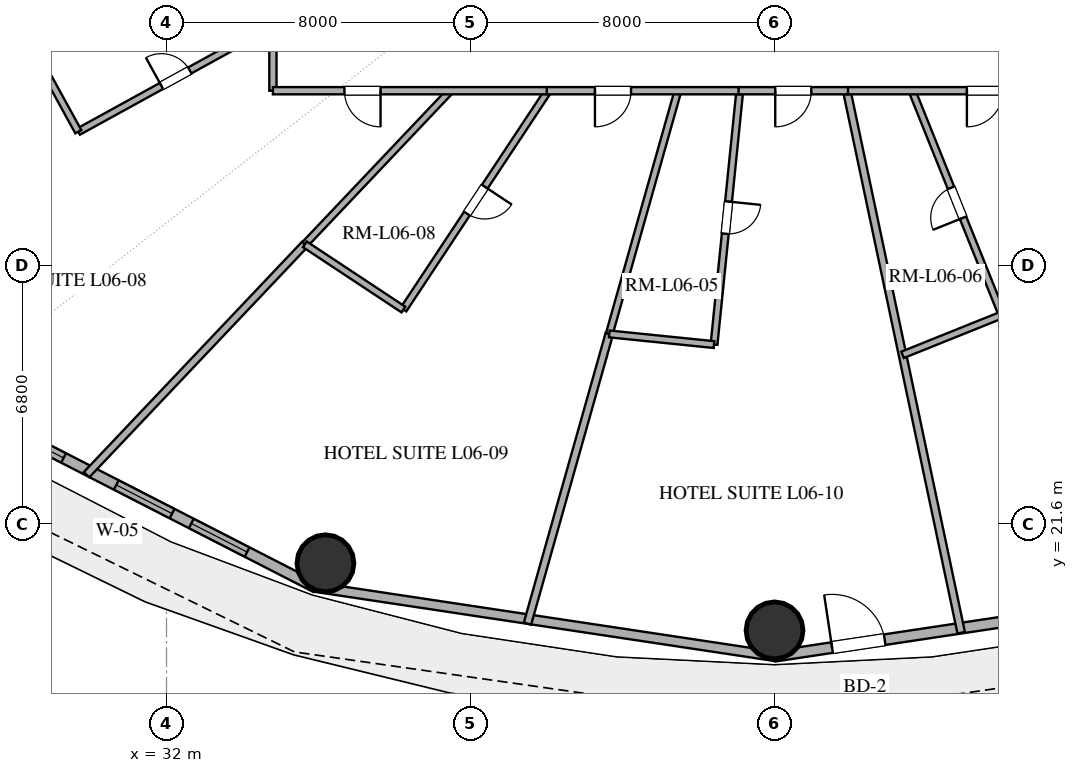
"""IFC4 building model, lengths in metres.
Left out: names, types, materials, properties, quantities, classifications, styles, units other than length and angle.
Written with IfcOpenShell. Run it as: python <this file> out.ifc"""

import sys

from ifc_helpers import new_model, si_unit, direction, frame, frame_2d, origin, origin_2d, place, context, subcontext, project, spatial, rectangle, hollow_circle, extrude, element, fill, save


model = new_model("IFC4")
c1 = context("Model", 3, precision=1e-05, world=origin(), true_north=direction((0.0, 1.0)))
c2 = subcontext(c1, "Body", "Model", "MODEL_VIEW")
j1 = project(units=[si_unit("LENGTHUNIT", "METRE"), si_unit("PLANEANGLEUNIT", "RADIAN")], contexts=[c1])
p1 = place(None, origin())
s1 = spatial("IfcSite", under=j1, at=p1, CompositionType="ELEMENT")
p2 = place(p1, origin())
s2 = spatial("IfcBuilding", under=s1, at=p2, CompositionType="ELEMENT")
p3 = place(p2, frame((0.0, 0.0, 31.8)))
s3 = spatial("IfcBuildingStorey", under=s2, at=p3, CompositionType="ELEMENT", Elevation=31.8)
for number, where, z_axis, x_axis in (
    (1, (36.182, 20.566, 0.0), (0.0, 0.0, 1.0), (1.0, 0.0, 0.0)),
    (2, (48.0, 18.8, 0.0), (0.0, 0.0, 1.0), (1.0, 0.0, 0.0)),
):
    element("IfcColumn", number, at=place(p3, frame(where, z_axis=z_axis, x_axis=x_axis)), inside=s3, PredefinedType="COLUMN", context=c2, shape_type="SweptSolid", body=[
        extrude(hollow_circle(Radius=0.75, WallThickness=0.04, at=origin_2d()), origin(), (0.0, 0.0, 1.0), 3.38),
    ])
p4 = place(p3, frame((25.826, 25.114, 0.0), z_axis=(0.0, 0.0, 1.0), x_axis=(0.889853976658, -0.456245438581, 0.0)))
e3 = element("IfcWall", 3, at=p4, inside=s3, PredefinedType="SOLIDWALL", context=c2, shape_type="SweptSolid", body=[
    extrude(rectangle(XDim=11.346, YDim=0.28, at=frame_2d((5.673, 0.0))), origin(), (0.0, 0.0, 1.0), 3.38),
])
p5 = place(p4, frame((2.095, 0.0, 0.85)))
e4 = element("IfcOpeningElement", 4, at=p5, cuts=e3, PredefinedType="OPENING", context=c2, shape_type="SweptSolid", body=[
    extrude(rectangle(XDim=1.8, YDim=2.2, at=frame_2d((0.9, 1.1))), frame((0.0, 0.15, 0.0), z_axis=(0.0, -1.0, 0.0), x_axis=(1.0, 0.0, 0.0)), (0.0, 0.0, 1.0), 0.3),
])
p6 = place(p4, frame((5.453, 0.0, 0.85)))
e5 = element("IfcOpeningElement", 5, at=p6, cuts=e3, PredefinedType="OPENING", context=c2, shape_type="SweptSolid", body=[
    extrude(rectangle(XDim=1.65, YDim=2.0, at=frame_2d((0.825, 1.0))), frame((0.0, 0.15, 0.0), z_axis=(0.0, -1.0, 0.0), x_axis=(1.0, 0.0, 0.0)), (0.0, 0.0, 1.0), 0.3),
])
p7 = place(p4, frame((7.672, 0.0, 0.85)))
e6 = element("IfcOpeningElement", 6, at=p7, cuts=e3, PredefinedType="OPENING", context=c2, shape_type="SweptSolid", body=[
    extrude(rectangle(XDim=1.65, YDim=2.0, at=frame_2d((0.825, 1.0))), frame((0.0, 0.15, 0.0), z_axis=(0.0, -1.0, 0.0), x_axis=(1.0, 0.0, 0.0)), (0.0, 0.0, 1.0), 0.3),
])
p8 = place(p3, frame((35.922, 19.938, 0.0), z_axis=(0.0, 0.0, 1.0), x_axis=(0.988864835849, -0.148816452121, 0.0)))
e7 = element("IfcWall", 7, at=p8, inside=s3, PredefinedType="SOLIDWALL", context=c2, shape_type="SweptSolid", body=[
    extrude(rectangle(XDim=12.214, YDim=0.25, at=frame_2d((6.107, 0.0))), origin(), (0.0, 0.0, 1.0), 3.38),
])
p9 = place(p3, frame((48.0, 18.12, 0.0), z_axis=(0.0, 0.0, 1.0), x_axis=(0.988864835849, 0.148816452121, 0.0)))
e8 = element("IfcWall", 8, at=p9, inside=s3, PredefinedType="SOLIDWALL", context=c2, shape_type="SweptSolid", body=[
    extrude(rectangle(XDim=12.214, YDim=0.28, at=frame_2d((6.107, 0.0))), origin(), (0.0, 0.0, 1.0), 3.38),
])
p10 = place(p9, frame((1.531, 0.0, 0.0)))
e9 = element("IfcOpeningElement", 9, at=p10, cuts=e8, PredefinedType="OPENING", context=c2, shape_type="SweptSolid", body=[
    extrude(rectangle(XDim=1.4, YDim=2.2, at=frame_2d((0.7, 1.1))), frame((0.0, 0.15, 0.0), z_axis=(0.0, -1.0, 0.0), x_axis=(1.0, 0.0, 0.0)), (0.0, 0.0, 1.0), 0.3),
])
p11 = place(p9, frame((6.016, 0.0, 0.85)))
e10 = element("IfcOpeningElement", 10, at=p11, cuts=e8, PredefinedType="OPENING", context=c2, shape_type="SweptSolid", body=[
    extrude(rectangle(XDim=1.5, YDim=1.8, at=frame_2d((0.75, 0.9))), frame((0.0, 0.15, 0.0), z_axis=(0.0, -1.0, 0.0), x_axis=(1.0, 0.0, 0.0)), (0.0, 0.0, 1.0), 0.3),
])
p12 = place(p9, frame((8.333, 0.0, 0.85)))
e11 = element("IfcOpeningElement", 11, at=p12, cuts=e8, PredefinedType="OPENING", context=c2, shape_type="SweptSolid", body=[
    extrude(rectangle(XDim=1.5, YDim=1.8, at=frame_2d((0.75, 0.9))), frame((0.0, 0.15, 0.0), z_axis=(0.0, -1.0, 0.0), x_axis=(1.0, 0.0, 0.0)), (0.0, 0.0, 1.0), 0.3),
])
p13 = place(p3, frame((34.8, 37.494, 0.0), z_axis=(0.0, 0.0, 1.0), x_axis=(-0.946390715793, -0.32302416792, 0.0)))
e12 = element("IfcWall", 12, at=p13, inside=s3, PredefinedType="PARTITIONING", context=c2, shape_type="SweptSolid", body=[
    extrude(rectangle(XDim=15.952, YDim=0.2, at=frame_2d((7.976, 0.0))), origin(), (0.0, 0.0, 1.0), 2.74),
])
p14 = place(p3, frame((29.897, 22.898, 0.0), z_axis=(0.0, 0.0, 1.0), x_axis=(0.687860615602, 0.725842802198, 0.0)))
e13 = element("IfcWall", 13, at=p14, inside=s3, PredefinedType="PARTITIONING", context=c2, shape_type="SweptSolid", body=[
    extrude(rectangle(XDim=8.35, YDim=0.2, at=frame_2d((4.175, 0.0))), origin(), (0.0, 0.0, 1.0), 2.74),
])
p15 = place(p3, frame((41.499, 18.978, 0.0), z_axis=(0.0, 0.0, 1.0), x_axis=(0.271768364569, 0.962362694632, 0.0)))
e14 = element("IfcWall", 14, at=p15, inside=s3, PredefinedType="PARTITIONING", context=c2, shape_type="SweptSolid", body=[
    extrude(rectangle(XDim=7.921, YDim=0.2, at=frame_2d((3.96, 0.0))), origin(), (0.0, 0.0, 1.0), 2.74),
])
p16 = place(p3, frame((49.9, 33.0, 0.0), z_axis=(0.0, 0.0, 1.0), x_axis=(0.206598790959, -0.97842574556, 0.0)))
e15 = element("IfcWall", 15, at=p16, inside=s3, PredefinedType="PARTITIONING", context=c2, shape_type="SweptSolid", body=[
    extrude(rectangle(XDim=14.576, YDim=0.2, at=frame_2d((7.288, 0.0))), origin(), (0.0, 0.0, 1.0), 2.74),
])
p17 = place(p3, frame((42.045, 33.0, 0.0), z_axis=(0.0, 0.0, 1.0), x_axis=(-0.551832909025, -0.833954699319, 0.0)))
e16 = element("IfcWall", 16, at=p17, inside=s3, PredefinedType="PLUMBINGWALL", context=c2, shape_type="SweptSolid", body=[
    extrude(rectangle(XDim=6.905, YDim=0.18, at=frame_2d((3.452, 0.0))), origin(), (0.0, 0.0, 1.0), 2.74),
])
p18 = place(p17, frame((3.027, 0.0, 0.0)))
e17 = element("IfcOpeningElement", 17, at=p18, cuts=e16, PredefinedType="OPENING", context=c2, shape_type="SweptSolid", body=[
    extrude(rectangle(XDim=0.85, YDim=2.1, at=frame_2d((0.425, 1.05))), frame((0.0, 0.1, 0.0), z_axis=(0.0, -1.0, 0.0), x_axis=(1.0, 0.0, 0.0)), (0.0, 0.0, 1.0), 0.2),
])
p19 = place(p3, frame((47.086, 33.0, 0.0), z_axis=(0.0, 0.0, 1.0), x_axis=(-0.101019373019, -0.994884458756, 0.0)))
e18 = element("IfcWall", 18, at=p19, inside=s3, PredefinedType="PLUMBINGWALL", context=c2, shape_type="SweptSolid", body=[
    extrude(rectangle(XDim=6.714, YDim=0.18, at=frame_2d((3.357, 0.0))), origin(), (0.0, 0.0, 1.0), 2.74),
])
p20 = place(p19, frame((2.932, 0.0, 0.0)))
e19 = element("IfcOpeningElement", 19, at=p20, cuts=e18, PredefinedType="OPENING", context=c2, shape_type="SweptSolid", body=[
    extrude(rectangle(XDim=0.85, YDim=2.1, at=frame_2d((0.425, 1.05))), frame((0.0, 0.1, 0.0), z_axis=(0.0, -1.0, 0.0), x_axis=(1.0, 0.0, 0.0)), (0.0, 0.0, 1.0), 0.2),
])
p21 = place(p3, frame((43.651, 26.601, 0.0), z_axis=(0.0, 0.0, 1.0), x_axis=(0.271761873698, 0.962364527611, 0.0)))
e20 = element("IfcWall", 20, at=p21, inside=s3, PredefinedType="PLUMBINGWALL", context=c2, shape_type="SweptSolid", body=[
    extrude(rectangle(XDim=6.65, YDim=0.18, at=frame_2d((3.325, 0.0))), origin(), (0.0, 0.0, 1.0), 2.74),
])
p22 = place(p3, frame((34.8, 33.0, 0.0), z_axis=(0.0, 0.0, 1.0), x_axis=(0.0, 1.0, 0.0)))
e21 = element("IfcWall", 21, at=p22, inside=s3, PredefinedType="PARTITIONING", context=c2, shape_type="SweptSolid", body=[
    extrude(rectangle(XDim=18.0, YDim=0.19, at=frame_2d((9.0, 0.0))), origin(), (0.0, 0.0, 1.0), 2.74),
])
p23 = place(p22, frame((7.274, 0.0, 0.0)))
e22 = element("IfcOpeningElement", 22, at=p23, cuts=e21, PredefinedType="OPENING", context=c2, shape_type="SweptSolid", body=[
    extrude(rectangle(XDim=1.0, YDim=2.2, at=frame_2d((0.5, 1.1))), frame((0.0, 0.105, 0.0), z_axis=(0.0, -1.0, 0.0), x_axis=(1.0, 0.0, 0.0)), (0.0, 0.0, 1.0), 0.21),
])
p24 = place(p22, frame((12.854, 0.0, 0.0)))
e23 = element("IfcOpeningElement", 23, at=p24, cuts=e21, PredefinedType="OPENING", context=c2, shape_type="SweptSolid", body=[
    extrude(rectangle(XDim=0.95, YDim=2.15, at=frame_2d((0.475, 1.075))), frame((0.0, 0.105, 0.0), z_axis=(0.0, -1.0, 0.0), x_axis=(1.0, 0.0, 0.0)), (0.0, 0.0, 1.0), 0.21),
])
p25 = place(p3, frame((53.987, 27.102, 0.0), z_axis=(0.0, 0.0, 1.0), x_axis=(-0.37285379951, 0.927890103509, 0.0)))
e24 = element("IfcWall", 24, at=p25, inside=s3, PredefinedType="PLUMBINGWALL", context=c2, shape_type="SweptSolid", body=[
    extrude(rectangle(XDim=6.356, YDim=0.18, at=frame_2d((3.178, 0.0))), origin(), (0.0, 0.0, 1.0), 2.74),
])
p26 = place(p25, frame((2.753, 0.0, 0.0)))
e25 = element("IfcOpeningElement", 25, at=p26, cuts=e24, PredefinedType="OPENING", context=c2, shape_type="SweptSolid", body=[
    extrude(rectangle(XDim=0.85, YDim=2.1, at=frame_2d((0.425, 1.05))), frame((0.0, 0.1, 0.0), z_axis=(0.0, -1.0, 0.0), x_axis=(1.0, 0.0, 0.0)), (0.0, 0.0, 1.0), 0.2),
])
p27 = place(p3, frame((29.679, 31.922, 0.0), z_axis=(0.0, 0.0, 1.0), x_axis=(0.876185038284, 0.481974873503, 0.0)))
e26 = element("IfcWall", 26, at=p27, inside=s3, PredefinedType="PLUMBINGWALL", context=c2, shape_type="SweptSolid", body=[
    extrude(rectangle(XDim=5.844, YDim=0.18, at=frame_2d((2.922, 0.0))), origin(), (0.0, 0.0, 1.0), 2.74),
])
p28 = place(p27, frame((2.497, 0.0, 0.0)))
e27 = element("IfcOpeningElement", 27, at=p28, cuts=e26, PredefinedType="OPENING", context=c2, shape_type="SweptSolid", body=[
    extrude(rectangle(XDim=0.85, YDim=2.1, at=frame_2d((0.425, 1.05))), frame((0.0, 0.1, 0.0), z_axis=(0.0, -1.0, 0.0), x_axis=(1.0, 0.0, 0.0)), (0.0, 0.0, 1.0), 0.2),
])
p29 = place(p3, frame((35.64, 28.958, 0.0), z_axis=(0.0, 0.0, 1.0), x_axis=(0.687867465085, 0.725836311077, 0.0)))
e28 = element("IfcWall", 28, at=p29, inside=s3, PredefinedType="PLUMBINGWALL", context=c2, shape_type="SweptSolid", body=[
    extrude(rectangle(XDim=5.568, YDim=0.18, at=frame_2d((2.784, 0.0))), origin(), (0.0, 0.0, 1.0), 2.74),
])
p30 = place(p3, frame((42.083, 33.0, 0.0), z_axis=(0.0, 0.0, 1.0), x_axis=(-1.0, 0.0, 0.0)))
e29 = element("IfcWall", 29, at=p30, inside=s3, PredefinedType="PARTITIONING", context=c2, shape_type="SweptSolid", body=[
    extrude(rectangle(XDim=7.283, YDim=0.19, at=frame_2d((3.642, 0.0))), origin(), (0.0, 0.0, 1.0), 2.74),
])
p31 = place(p30, frame((4.451, 0.0, 0.0)))
e30 = element("IfcOpeningElement", 30, at=p31, cuts=e29, PredefinedType="OPENING", context=c2, shape_type="SweptSolid", body=[
    extrude(rectangle(XDim=0.95, YDim=2.15, at=frame_2d((0.475, 1.075))), frame((0.0, 0.105, 0.0), z_axis=(0.0, -1.0, 0.0), x_axis=(1.0, 0.0, 0.0)), (0.0, 0.0, 1.0), 0.21),
])
p32 = place(p3, frame((61.2, 33.0, 0.0), z_axis=(0.0, 0.0, 1.0), x_axis=(-1.0, 0.0, 0.0)))
e31 = element("IfcWall", 31, at=p32, inside=s3, PredefinedType="PARTITIONING", context=c2, shape_type="SweptSolid", body=[
    extrude(rectangle(XDim=11.3, YDim=0.19, at=frame_2d((5.65, 0.0))), origin(), (0.0, 0.0, 1.0), 2.74),
])
p33 = place(p32, frame((7.188, 0.0, 0.0)))
e32 = element("IfcOpeningElement", 32, at=p33, cuts=e31, PredefinedType="OPENING", context=c2, shape_type="SweptSolid", body=[
    extrude(rectangle(XDim=0.95, YDim=2.15, at=frame_2d((0.475, 1.075))), frame((0.0, 0.105, 0.0), z_axis=(0.0, -1.0, 0.0), x_axis=(1.0, 0.0, 0.0)), (0.0, 0.0, 1.0), 0.21),
])
p34 = place(p3, frame((27.908, 35.142, 0.0), z_axis=(0.0, 0.0, 1.0), x_axis=(0.481967195945, -0.876189261537, 0.0)))
e33 = element("IfcWall", 33, at=p34, inside=s3, PredefinedType="PLUMBINGWALL", context=c2, shape_type="SweptSolid", body=[
    extrude(rectangle(XDim=3.676, YDim=0.18, at=frame_2d((1.838, 0.0))), origin(), (0.0, 0.0, 1.0), 2.74),
])
p35 = place(p3, frame((47.118, 33.0, 0.0), z_axis=(0.0, 0.0, 1.0), x_axis=(-1.0, 0.0, 0.0)))
e34 = element("IfcWall", 34, at=p35, inside=s3, PredefinedType="PARTITIONING", context=c2, shape_type="SweptSolid", body=[
    extrude(rectangle(XDim=5.112, YDim=0.19, at=frame_2d((2.556, 0.0))), origin(), (0.0, 0.0, 1.0), 2.74),
])
p36 = place(p35, frame((2.894, 0.0, 0.0)))
e35 = element("IfcOpeningElement", 35, at=p36, cuts=e34, PredefinedType="OPENING", context=c2, shape_type="SweptSolid", body=[
    extrude(rectangle(XDim=0.95, YDim=2.15, at=frame_2d((0.475, 1.075))), frame((0.0, 0.105, 0.0), z_axis=(0.0, -1.0, 0.0), x_axis=(1.0, 0.0, 0.0)), (0.0, 0.0, 1.0), 0.21),
])
p37 = place(p3, frame((38.235, 27.242, 0.0), z_axis=(0.0, 0.0, 1.0), x_axis=(-0.833965136837, 0.551817135055, 0.0)))
e36 = element("IfcWall", 36, at=p37, inside=s3, PredefinedType="PLUMBINGWALL", context=c2, shape_type="SweptSolid", body=[
    extrude(rectangle(XDim=3.111, YDim=0.18, at=frame_2d((1.555, 0.0))), origin(), (0.0, 0.0, 1.0), 2.74),
])
p38 = place(p3, frame((49.933, 33.0, 0.0), z_axis=(0.0, 0.0, 1.0), x_axis=(-1.0, 0.0, 0.0)))
e37 = element("IfcWall", 37, at=p38, inside=s3, PredefinedType="PARTITIONING", context=c2, shape_type="SweptSolid", body=[
    extrude(rectangle(XDim=2.879, YDim=0.19, at=frame_2d((1.44, 0.0))), origin(), (0.0, 0.0, 1.0), 2.74),
])
p39 = place(p38, frame((0.965, 0.0, 0.0)))
e38 = element("IfcOpeningElement", 38, at=p39, cuts=e37, PredefinedType="OPENING", context=c2, shape_type="SweptSolid", body=[
    extrude(rectangle(XDim=0.95, YDim=2.15, at=frame_2d((0.475, 1.075))), frame((0.0, 0.105, 0.0), z_axis=(0.0, -1.0, 0.0), x_axis=(1.0, 0.0, 0.0)), (0.0, 0.0, 1.0), 0.21),
])
p40 = place(p3, frame((51.368, 26.05, 0.0), z_axis=(0.0, 0.0, 1.0), x_axis=(0.927890861741, 0.372851912558, 0.0)))
e39 = element("IfcWall", 39, at=p40, inside=s3, PredefinedType="PLUMBINGWALL", context=c2, shape_type="SweptSolid", body=[
    extrude(rectangle(XDim=2.822, YDim=0.18, at=frame_2d((1.411, 0.0))), origin(), (0.0, 0.0, 1.0), 2.74),
])
p41 = place(p3, frame((46.407, 26.321, 0.0), z_axis=(0.0, 0.0, 1.0), x_axis=(-0.994878004338, 0.101082918857, 0.0)))
e40 = element("IfcWall", 40, at=p41, inside=s3, PredefinedType="PLUMBINGWALL", context=c2, shape_type="SweptSolid", body=[
    extrude(rectangle(XDim=2.77, YDim=0.18, at=frame_2d((1.385, 0.0))), origin(), (0.0, 0.0, 1.0), 2.74),
])
p42 = place(p5, origin())
e41 = element("IfcWindow", 41, at=p42, inside=s3, PartitioningType="SINGLE_PANEL", PredefinedType="WINDOW", context=c2, shape_type="SweptSolid", body=[
    extrude(rectangle(XDim=1.8, YDim=2.2, at=frame_2d((0.9, 1.1))), frame((0.0, 0.03, 0.0), z_axis=(0.0, -1.0, 0.0), x_axis=(1.0, 0.0, 0.0)), (0.0, 0.0, 1.0), 0.06),
])
fill(e4, e41)
p43 = place(p6, origin())
e42 = element("IfcWindow", 42, at=p43, inside=s3, PartitioningType="SINGLE_PANEL", PredefinedType="WINDOW", context=c2, shape_type="SweptSolid", body=[
    extrude(rectangle(XDim=1.65, YDim=2.0, at=frame_2d((0.825, 1.0))), frame((0.0, 0.03, 0.0), z_axis=(0.0, -1.0, 0.0), x_axis=(1.0, 0.0, 0.0)), (0.0, 0.0, 1.0), 0.06),
])
fill(e5, e42)
p44 = place(p7, origin())
e43 = element("IfcWindow", 43, at=p44, inside=s3, PartitioningType="SINGLE_PANEL", PredefinedType="WINDOW", context=c2, shape_type="SweptSolid", body=[
    extrude(rectangle(XDim=1.65, YDim=2.0, at=frame_2d((0.825, 1.0))), frame((0.0, 0.03, 0.0), z_axis=(0.0, -1.0, 0.0), x_axis=(1.0, 0.0, 0.0)), (0.0, 0.0, 1.0), 0.06),
])
fill(e6, e43)
p45 = place(p10, origin())
e44 = element("IfcDoor", 44, at=p45, inside=s3, OperationType="SINGLE_SWING_LEFT", PredefinedType="DOOR", context=c2, shape_type="SweptSolid", body=[
    extrude(rectangle(XDim=1.4, YDim=2.2, at=frame_2d((0.7, 1.1))), frame((0.0, 0.025, 0.0), z_axis=(0.0, -1.0, 0.0), x_axis=(1.0, 0.0, 0.0)), (0.0, 0.0, 1.0), 0.05),
])
fill(e9, e44)
p46 = place(p18, origin())
e45 = element("IfcDoor", 45, at=p46, inside=s3, OperationType="SINGLE_SWING_LEFT", PredefinedType="DOOR", context=c2, shape_type="SweptSolid", body=[
    extrude(rectangle(XDim=0.85, YDim=2.1, at=frame_2d((0.425, 1.05))), frame((0.0, 0.025, 0.0), z_axis=(0.0, -1.0, 0.0), x_axis=(1.0, 0.0, 0.0)), (0.0, 0.0, 1.0), 0.05),
])
fill(e17, e45)
p47 = place(p20, origin())
e46 = element("IfcDoor", 46, at=p47, inside=s3, OperationType="SINGLE_SWING_LEFT", PredefinedType="DOOR", context=c2, shape_type="SweptSolid", body=[
    extrude(rectangle(XDim=0.85, YDim=2.1, at=frame_2d((0.425, 1.05))), frame((0.0, 0.025, 0.0), z_axis=(0.0, -1.0, 0.0), x_axis=(1.0, 0.0, 0.0)), (0.0, 0.0, 1.0), 0.05),
])
fill(e19, e46)
p48 = place(p26, origin())
e47 = element("IfcDoor", 47, at=p48, inside=s3, OperationType="SINGLE_SWING_LEFT", PredefinedType="DOOR", context=c2, shape_type="SweptSolid", body=[
    extrude(rectangle(XDim=0.85, YDim=2.1, at=frame_2d((0.425, 1.05))), frame((0.0, 0.025, 0.0), z_axis=(0.0, -1.0, 0.0), x_axis=(1.0, 0.0, 0.0)), (0.0, 0.0, 1.0), 0.05),
])
fill(e25, e47)
p49 = place(p28, origin())
e48 = element("IfcDoor", 48, at=p49, inside=s3, OperationType="SINGLE_SWING_LEFT", PredefinedType="DOOR", context=c2, shape_type="SweptSolid", body=[
    extrude(rectangle(XDim=0.85, YDim=2.1, at=frame_2d((0.425, 1.05))), frame((0.0, 0.025, 0.0), z_axis=(0.0, -1.0, 0.0), x_axis=(1.0, 0.0, 0.0)), (0.0, 0.0, 1.0), 0.05),
])
fill(e27, e48)
p50 = place(p31, origin())
e49 = element("IfcDoor", 49, at=p50, inside=s3, OperationType="SINGLE_SWING_LEFT", PredefinedType="DOOR", context=c2, shape_type="SweptSolid", body=[
    extrude(rectangle(XDim=0.95, YDim=2.15, at=frame_2d((0.475, 1.075))), frame((0.0, 0.025, 0.0), z_axis=(0.0, -1.0, 0.0), x_axis=(1.0, 0.0, 0.0)), (0.0, 0.0, 1.0), 0.05),
])
fill(e30, e49)
p51 = place(p33, origin())
e50 = element("IfcDoor", 50, at=p51, inside=s3, OperationType="SINGLE_SWING_RIGHT", PredefinedType="DOOR", context=c2, shape_type="SweptSolid", body=[
    extrude(rectangle(XDim=0.95, YDim=2.15, at=frame_2d((0.475, 1.075))), frame((0.0, 0.025, 0.0), z_axis=(0.0, -1.0, 0.0), x_axis=(1.0, 0.0, 0.0)), (0.0, 0.0, 1.0), 0.05),
])
fill(e32, e50)
p52 = place(p36, origin())
e51 = element("IfcDoor", 51, at=p52, inside=s3, OperationType="SINGLE_SWING_RIGHT", PredefinedType="DOOR", context=c2, shape_type="SweptSolid", body=[
    extrude(rectangle(XDim=0.95, YDim=2.15, at=frame_2d((0.475, 1.075))), frame((0.0, 0.025, 0.0), z_axis=(0.0, -1.0, 0.0), x_axis=(1.0, 0.0, 0.0)), (0.0, 0.0, 1.0), 0.05),
])
fill(e35, e51)
p53 = place(p39, origin())
e52 = element("IfcDoor", 52, at=p53, inside=s3, OperationType="SINGLE_SWING_RIGHT", PredefinedType="DOOR", context=c2, shape_type="SweptSolid", body=[
    extrude(rectangle(XDim=0.95, YDim=2.15, at=frame_2d((0.475, 1.075))), frame((0.0, 0.025, 0.0), z_axis=(0.0, -1.0, 0.0), x_axis=(1.0, 0.0, 0.0)), (0.0, 0.0, 1.0), 0.05),
])
fill(e38, e52)
save(model, sys.argv[1])
